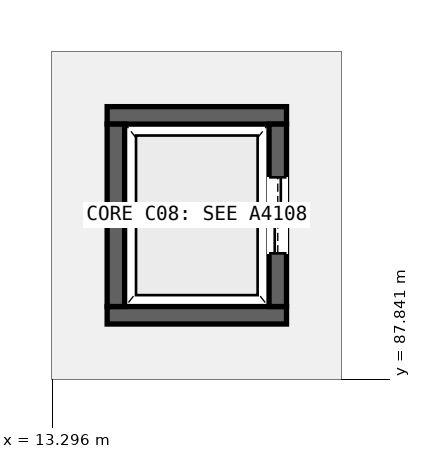
"""IFC4 building model, lengths in metres.
Left out: names, types, materials, properties, quantities, classifications, styles, units other than length and angle.
Written with IfcOpenShell. Run it as: python <this file> out.ifc"""

import sys

from ifc_helpers import new_model, si_unit, direction, frame, frame_2d, origin, place, context, subcontext, project, spatial, rectangle, extrude, element, fill, save


model = new_model("IFC4")
c1 = context("Model", 3, precision=1e-05, world=origin(), true_north=direction((0.0, 1.0)))
c2 = subcontext(c1, "Body", "Model", "MODEL_VIEW")
j1 = project(units=[si_unit("LENGTHUNIT", "METRE"), si_unit("PLANEANGLEUNIT", "RADIAN")], contexts=[c1])
p1 = place(None, origin())
s1 = spatial("IfcSite", under=j1, at=p1, CompositionType="ELEMENT")
p2 = place(p1, origin())
s2 = spatial("IfcBuilding", under=s1, at=p2, CompositionType="ELEMENT")
p3 = place(p2, origin())
s3 = spatial("IfcBuildingStorey", under=s2, at=p3, CompositionType="ELEMENT", Elevation=0.0)
for number, where, z_axis, x_axis in (
    (1, (14.02, 88.685, 0.0), (0.0, 0.0, 1.0), (1.0, 0.0, 0.0)),
    (2, (14.02, 91.315, 0.0), (0.0, 0.0, 1.0), (1.0, 0.0, 0.0)),
):
    element("IfcWall", number, at=place(p3, frame(where, z_axis=z_axis, x_axis=x_axis)), inside=s3, PredefinedType="SHEAR", context=c2, shape_type="SweptSolid", body=[
        extrude(rectangle(XDim=2.36, YDim=0.23, at=frame_2d((1.18, 0.0))), origin(), (0.0, 0.0, 1.0), 5.14),
    ])
p4 = place(p3, frame((14.135, 88.8, 0.0), z_axis=(0.0, 0.0, 1.0), x_axis=(0.0, 1.0, 0.0)))
e3 = element("IfcWall", 3, at=p4, inside=s3, PredefinedType="SHEAR", context=c2, shape_type="SweptSolid", body=[
    extrude(rectangle(XDim=2.4, YDim=0.23, at=frame_2d((1.2, 0.0))), origin(), (0.0, 0.0, 1.0), 5.14),
])
p5 = place(p3, frame((16.265, 88.8, 0.0), z_axis=(0.0, 0.0, 1.0), x_axis=(0.0, 1.0, 0.0)))
e4 = element("IfcWall", 4, at=p5, inside=s3, PredefinedType="SHEAR", context=c2, shape_type="SweptSolid", body=[
    extrude(rectangle(XDim=2.4, YDim=0.23, at=frame_2d((1.2, 0.0))), origin(), (0.0, 0.0, 1.0), 5.14),
])
p6 = place(p5, frame((0.7, 0.0, 0.0)))
e5 = element("IfcOpeningElement", 5, at=p6, cuts=e4, PredefinedType="OPENING", context=c2, shape_type="SweptSolid", body=[
    extrude(rectangle(XDim=1.0, YDim=2.15, at=frame_2d((0.5, 1.075))), frame((0.0, 0.125, 0.0), z_axis=(0.0, -1.0, 0.0), x_axis=(1.0, 0.0, 0.0)), (0.0, 0.0, 1.0), 0.25),
])
p7 = place(p6, origin())
e6 = element("IfcDoor", 6, at=p7, inside=s3, OperationType="DOUBLE_DOOR_SLIDING", PredefinedType="DOOR", context=c2, shape_type="SweptSolid", body=[
    extrude(rectangle(XDim=1.0, YDim=2.15, at=frame_2d((0.5, 1.075))), frame((0.0, 0.025, 0.0), z_axis=(0.0, -1.0, 0.0), x_axis=(1.0, 0.0, 0.0)), (0.0, 0.0, 1.0), 0.05),
])
fill(e5, e6)
save(model, sys.argv[1])
